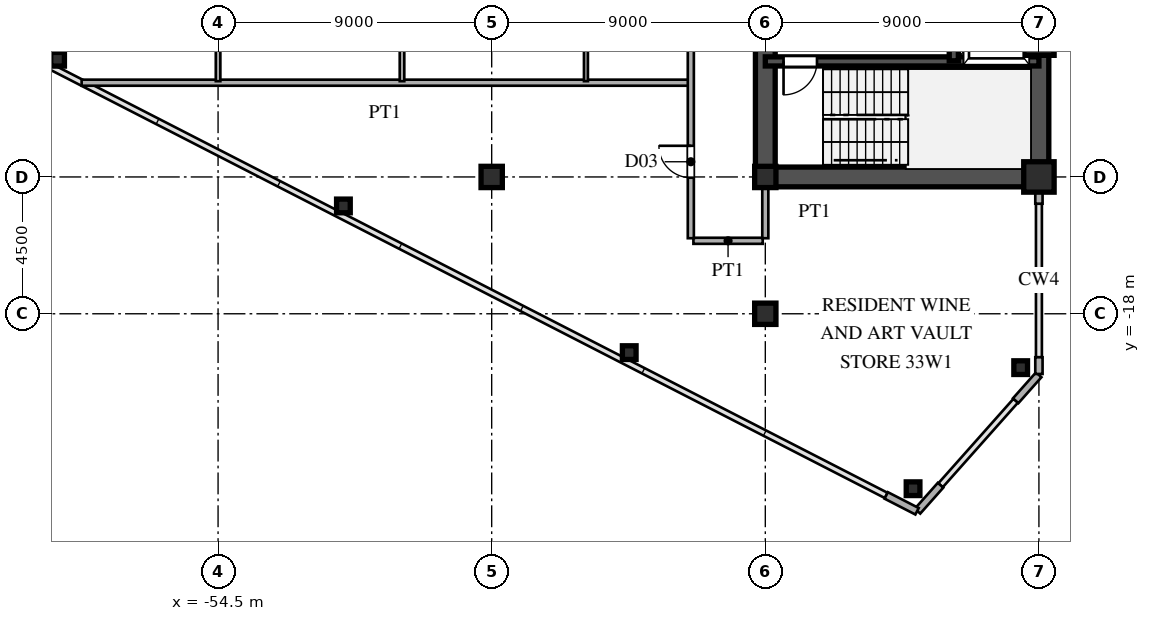
"""IFC4 building model, lengths in metres.
Left out: names, types, materials, properties, quantities, classifications, styles, units other than length and angle.
Written with IfcOpenShell. Run it as: python <this file> out.ifc"""

import sys

from ifc_helpers import new_model, si_unit, direction, frame, frame_2d, origin, origin_2d, place, context, subcontext, project, spatial, rectangle, hollow_rectangle, i_section, extrude, source, transform, mapped, element, fill, save


model = new_model("IFC4")
c1 = context("Model", 3, precision=1e-05, world=origin(), true_north=direction((0.0, 1.0)))
c2 = subcontext(c1, "Body", "Model", "MODEL_VIEW")
j1 = project(units=[si_unit("LENGTHUNIT", "METRE"), si_unit("PLANEANGLEUNIT", "RADIAN")], contexts=[c1])
p1 = place(None, origin())
s1 = spatial("IfcSite", under=j1, at=p1, CompositionType="ELEMENT")
p2 = place(p1, origin())
s2 = spatial("IfcBuilding", under=s1, at=p2, CompositionType="ELEMENT")
p3 = place(p2, frame((0.0, 0.0, 124.8)))
s3 = spatial("IfcBuildingStorey", under=s2, at=p3, CompositionType="ELEMENT", Elevation=124.8)
m1 = source(origin(), c2, "Body", "SweptSolid", [
    extrude(hollow_rectangle(XDim=1.0, YDim=1.0, WallThickness=0.042, at=origin_2d()), origin(), (0.0, 0.0, 1.0), 3.6),
])
for number, where, z_axis, x_axis in (
    (1, (-27.5, -13.5, 0.0), (0.0, 0.0, 1.0), (1.0, 0.0, 0.0)),
    (2, (-27.5, -9.0, 0.0), (0.0, 0.0, 1.0), (1.0, 0.0, 0.0)),
):
    element("IfcColumn", number, at=place(p3, frame(where, z_axis=z_axis, x_axis=x_axis)), inside=s3, PredefinedType="COLUMN", context=c2, shape_type="MappedRepresentation", body=[
        mapped(m1, transform((0.0, 0.0, 0.0), scale=1.0)),
    ])
m2 = source(origin(), c2, "Body", "SweptSolid", [
    extrude(i_section(OverallWidth=0.7, OverallDepth=0.7, WebThickness=0.028, FlangeThickness=0.045, at=origin_2d()), origin(), (0.0, 0.0, 1.0), 3.6),
])
for number, where, z_axis, x_axis in (
    (3, (-36.5, -18.0, 0.0), (0.0, 0.0, 1.0), (1.0, 0.0, 0.0)),
    (4, (-36.5, -13.5, 0.0), (0.0, 0.0, 1.0), (1.0, 0.0, 0.0)),
    (5, (-45.5, -13.5, 0.0), (0.0, 0.0, 1.0), (1.0, 0.0, 0.0)),
):
    element("IfcColumn", number, at=place(p3, frame(where, z_axis=z_axis, x_axis=x_axis)), inside=s3, PredefinedType="COLUMN", context=c2, shape_type="MappedRepresentation", body=[
        mapped(m2, transform((0.0, 0.0, 0.0), scale=1.0)),
    ])
m3 = source(origin(), c2, "Body", "SweptSolid", [
    extrude(hollow_rectangle(XDim=0.45, YDim=0.45, WallThickness=0.018, at=origin_2d()), origin(), (0.0, 0.0, 1.0), 3.6),
])
for number, where, z_axis, x_axis in (
    (6, (-28.1, -19.772, 0.0), (0.0, 0.0, 1.0), (1.0, 0.0, 0.0)),
    (7, (-31.64, -23.754, 0.0), (0.0, 0.0, 1.0), (1.0, 0.0, 0.0)),
    (8, (-40.976, -19.278, 0.0), (0.0, 0.0, 1.0), (1.0, 0.0, 0.0)),
    (9, (-50.377, -14.453, 0.0), (0.0, 0.0, 1.0), (1.0, 0.0, 0.0)),
    (10, (-59.779, -9.629, 0.0), (0.0, 0.0, 1.0), (1.0, 0.0, 0.0)),
):
    element("IfcColumn", number, at=place(p3, frame(where, z_axis=z_axis, x_axis=x_axis)), inside=s3, PredefinedType="COLUMN", context=c2, shape_type="MappedRepresentation", body=[
        mapped(m3, transform((0.0, 0.0, 0.0), scale=1.0)),
    ])
p4 = place(p3, frame((-27.5, -19.98, 0.0), z_axis=(0.0, 0.0, 1.0), x_axis=(0.0, 1.0, 0.0)))
e11 = element("IfcWall", 11, at=p4, inside=s3, PredefinedType="SOLIDWALL", context=c2, shape_type="SweptSolid", body=[
    extrude(rectangle(XDim=0.55, YDim=0.24, at=frame_2d((0.275, 0.0))), origin(), (0.0, 0.0, 1.0), 3.38),
])
p5 = place(p3, frame((-27.5, -14.38, 0.0), z_axis=(0.0, 0.0, 1.0), x_axis=(0.0, 1.0, 0.0)))
e12 = element("IfcWall", 12, at=p5, inside=s3, PredefinedType="SOLIDWALL", context=c2, shape_type="SweptSolid", body=[
    extrude(rectangle(XDim=0.55, YDim=0.24, at=frame_2d((0.275, 0.0))), origin(), (0.0, 0.0, 1.0), 2.88),
])
p6 = place(p3, frame((-32.523, -23.975, 0.0), z_axis=(0.0, 0.0, 1.0), x_axis=(0.889797395748, -0.456355776255, 0.0)))
e13 = element("IfcWall", 13, at=p6, inside=s3, PredefinedType="SOLIDWALL", context=c2, shape_type="SweptSolid", body=[
    extrude(rectangle(XDim=1.14, YDim=0.24, at=frame_2d((0.57, 0.0))), origin(), (0.0, 0.0, 1.0), 3.38),
])
for number, where, z_axis, x_axis in (
    (14, (-31.493, -24.492, 0.0), (0.0, 0.0, 1.0), (0.664, 0.747, 0.0)),
    (15, (-28.264, -20.86, 0.0), (0.0, 0.0, 1.0), (0.664, 0.747, 0.0)),
):
    element("IfcWall", number, at=place(p3, frame(where, z_axis=z_axis, x_axis=x_axis)), inside=s3, PredefinedType="SOLIDWALL", context=c2, shape_type="SweptSolid", body=[
        extrude(rectangle(XDim=1.14, YDim=0.24, at=frame_2d((0.57, 0.0))), origin(), (0.0, 0.0, 1.0), 3.38),
    ])
p7 = place(p3, frame((-27.5, -13.5, 0.0), z_axis=(0.0, 0.0, 1.0), x_axis=(0.0, 1.0, 0.0)))
e16 = element("IfcWall", 16, at=p7, inside=s3, PredefinedType="SHEAR", context=c2, shape_type="SweptSolid", body=[
    extrude(rectangle(XDim=12.2, YDim=0.65, at=frame_2d((6.1, 0.0))), origin(), (0.0, 0.0, 1.0), 3.38),
])
p8 = place(p3, frame((-36.5, -13.5, 0.0), z_axis=(0.0, 0.0, 1.0), x_axis=(1.0, 0.0, 0.0)))
e17 = element("IfcWall", 17, at=p8, inside=s3, PredefinedType="SHEAR", context=c2, shape_type="SweptSolid", body=[
    extrude(rectangle(XDim=9.0, YDim=0.65, at=frame_2d((4.5, 0.0))), origin(), (0.0, 0.0, 1.0), 3.38),
])
p9 = place(p3, frame((-36.5, -13.65, 0.0), z_axis=(0.0, 0.0, 1.0), x_axis=(0.0, 1.0, 0.0)))
e18 = element("IfcWall", 18, at=p9, inside=s3, PredefinedType="SHEAR", context=c2, shape_type="SweptSolid", body=[
    extrude(rectangle(XDim=7.15, YDim=0.65, at=frame_2d((3.575, 0.0))), origin(), (0.0, 0.0, 1.0), 3.38),
])
p10 = place(p9, frame((4.675, 0.0, 0.0)))
e19 = element("IfcOpeningElement", 19, at=p10, cuts=e18, PredefinedType="OPENING", context=c2, shape_type="SweptSolid", body=[
    extrude(rectangle(XDim=1.15, YDim=2.2, at=frame_2d((0.575, 1.1))), frame((0.0, 0.335, 0.0), z_axis=(0.0, -1.0, 0.0), x_axis=(1.0, 0.0, 0.0)), (0.0, 0.0, 1.0), 0.67),
])
p11 = place(p3, frame((-36.5, -9.7, 0.0), z_axis=(0.0, 0.0, 1.0), x_axis=(1.0, 0.0, 0.0)))
e20 = element("IfcWall", 20, at=p11, inside=s3, PredefinedType="SHEAR", context=c2, shape_type="SweptSolid", body=[
    extrude(rectangle(XDim=9.0, YDim=0.3, at=frame_2d((4.5, 0.0))), origin(), (0.0, 0.0, 1.0), 3.38),
])
p12 = place(p11, frame((0.6, 0.0, 0.0)))
e21 = element("IfcOpeningElement", 21, at=p12, cuts=e20, PredefinedType="OPENING", context=c2, shape_type="SweptSolid", body=[
    extrude(rectangle(XDim=1.1, YDim=2.2, at=frame_2d((0.55, 1.1))), frame((0.0, 0.16, 0.0), z_axis=(0.0, -1.0, 0.0), x_axis=(1.0, 0.0, 0.0)), (0.0, 0.0, 1.0), 0.32),
])
p13 = place(p3, frame((-30.3, -9.68, 0.0), z_axis=(0.0, 0.0, 1.0), x_axis=(0.0, 1.0, 0.0)))
e22 = element("IfcWall", 22, at=p13, inside=s3, PredefinedType="SHEAR", context=c2, shape_type="SweptSolid", body=[
    extrude(rectangle(XDim=2.56, YDim=0.3, at=frame_2d((1.28, 0.0))), origin(), (0.0, 0.0, 1.0), 3.38),
])
p14 = place(p13, frame((0.68, 0.0, 0.0)))
e23 = element("IfcOpeningElement", 23, at=p14, cuts=e22, PredefinedType="OPENING", context=c2, shape_type="SweptSolid", body=[
    extrude(rectangle(XDim=1.2, YDim=2.25, at=frame_2d((0.6, 1.125))), frame((0.0, 0.16, 0.0), z_axis=(0.0, -1.0, 0.0), x_axis=(1.0, 0.0, 0.0)), (0.0, 0.0, 1.0), 0.32),
])
p15 = place(p3, frame((-38.865, -15.6, 0.0), z_axis=(0.0, 0.0, 1.0), x_axis=(1.0, 0.0, 0.0)))
e24 = element("IfcWall", 24, at=p15, inside=s3, PredefinedType="PARTITIONING", context=c2, shape_type="SweptSolid", body=[
    extrude(rectangle(XDim=2.28, YDim=0.2, at=frame_2d((1.14, 0.0))), origin(), (0.0, 0.0, 1.0), 3.38),
])
p16 = place(p3, frame((-58.988, -10.4, 0.0), z_axis=(0.0, 0.0, 1.0), x_axis=(1.0, 0.0, 0.0)))
e25 = element("IfcWall", 25, at=p16, inside=s3, PredefinedType="PARTITIONING", context=c2, shape_type="SweptSolid", body=[
    extrude(rectangle(XDim=19.958, YDim=0.2, at=frame_2d((9.979, 0.0))), origin(), (0.0, 0.0, 1.0), 3.38),
])
p17 = place(p3, frame((-54.5, -10.35, 0.0), z_axis=(0.0, 0.0, 1.0), x_axis=(0.0, 1.0, 0.0)))
e26 = element("IfcWall", 26, at=p17, inside=s3, PredefinedType="PARTITIONING", context=c2, shape_type="SweptSolid", body=[
    extrude(rectangle(XDim=23.082, YDim=0.15, at=frame_2d((11.541, 0.0))), origin(), (0.0, 0.0, 1.0), 2.78),
])
p18 = place(p17, frame((6.475, 0.0, 0.0)))
e27 = element("IfcOpeningElement", 27, at=p18, cuts=e26, PredefinedType="OPENING", context=c2, shape_type="SweptSolid", body=[
    extrude(rectangle(XDim=0.95, YDim=2.15, at=frame_2d((0.475, 1.075))), frame((0.0, 0.085, 0.0), z_axis=(0.0, -1.0, 0.0), x_axis=(1.0, 0.0, 0.0)), (0.0, 0.0, 1.0), 0.17),
])
p19 = place(p17, frame((11.142, 0.0, 0.0)))
e28 = element("IfcOpeningElement", 28, at=p19, cuts=e26, PredefinedType="OPENING", context=c2, shape_type="SweptSolid", body=[
    extrude(rectangle(XDim=0.95, YDim=2.15, at=frame_2d((0.475, 1.075))), frame((0.0, 0.085, 0.0), z_axis=(0.0, -1.0, 0.0), x_axis=(1.0, 0.0, 0.0)), (0.0, 0.0, 1.0), 0.17),
])
p20 = place(p17, frame((20.575, 0.0, 0.0)))
e29 = element("IfcOpeningElement", 29, at=p20, cuts=e26, PredefinedType="OPENING", context=c2, shape_type="SweptSolid", body=[
    extrude(rectangle(XDim=0.95, YDim=2.15, at=frame_2d((0.475, 1.075))), frame((0.0, 0.085, 0.0), z_axis=(0.0, -1.0, 0.0), x_axis=(1.0, 0.0, 0.0)), (0.0, 0.0, 1.0), 0.17),
])
p21 = place(p17, frame((16.026, 0.0, 0.0)))
e30 = element("IfcOpeningElement", 30, at=p21, cuts=e26, PredefinedType="OPENING", context=c2, shape_type="SweptSolid", body=[
    extrude(rectangle(XDim=0.95, YDim=2.15, at=frame_2d((0.475, 1.075))), frame((0.0, 0.085, 0.0), z_axis=(0.0, -1.0, 0.0), x_axis=(1.0, 0.0, 0.0)), (0.0, 0.0, 1.0), 0.17),
])
p22 = place(p3, frame((-48.45, -10.35, 0.0), z_axis=(0.0, 0.0, 1.0), x_axis=(0.0, 1.0, 0.0)))
e31 = element("IfcWall", 31, at=p22, inside=s3, PredefinedType="PARTITIONING", context=c2, shape_type="SweptSolid", body=[
    extrude(rectangle(XDim=24.104, YDim=0.15, at=frame_2d((12.052, 0.0))), origin(), (0.0, 0.0, 1.0), 3.38),
])
p23 = place(p22, frame((6.475, 0.0, 0.0)))
e32 = element("IfcOpeningElement", 32, at=p23, cuts=e31, PredefinedType="OPENING", context=c2, shape_type="SweptSolid", body=[
    extrude(rectangle(XDim=0.95, YDim=2.15, at=frame_2d((0.475, 1.075))), frame((0.0, 0.085, 0.0), z_axis=(0.0, -1.0, 0.0), x_axis=(1.0, 0.0, 0.0)), (0.0, 0.0, 1.0), 0.17),
])
p24 = place(p22, frame((1.808, 0.0, 0.0)))
e33 = element("IfcOpeningElement", 33, at=p24, cuts=e31, PredefinedType="OPENING", context=c2, shape_type="SweptSolid", body=[
    extrude(rectangle(XDim=0.95, YDim=2.15, at=frame_2d((0.475, 1.075))), frame((0.0, 0.085, 0.0), z_axis=(0.0, -1.0, 0.0), x_axis=(1.0, 0.0, 0.0)), (0.0, 0.0, 1.0), 0.17),
])
p25 = place(p22, frame((21.128, 0.0, 0.0)))
e34 = element("IfcOpeningElement", 34, at=p25, cuts=e31, PredefinedType="OPENING", context=c2, shape_type="SweptSolid", body=[
    extrude(rectangle(XDim=0.95, YDim=2.15, at=frame_2d((0.475, 1.075))), frame((0.0, 0.085, 0.0), z_axis=(0.0, -1.0, 0.0), x_axis=(1.0, 0.0, 0.0)), (0.0, 0.0, 1.0), 0.17),
])
p26 = place(p22, frame((16.026, 0.0, 0.0)))
e35 = element("IfcOpeningElement", 35, at=p26, cuts=e31, PredefinedType="OPENING", context=c2, shape_type="SweptSolid", body=[
    extrude(rectangle(XDim=0.95, YDim=2.15, at=frame_2d((0.475, 1.075))), frame((0.0, 0.085, 0.0), z_axis=(0.0, -1.0, 0.0), x_axis=(1.0, 0.0, 0.0)), (0.0, 0.0, 1.0), 0.17),
])
p27 = place(p3, frame((-42.4, -10.35, 0.0), z_axis=(0.0, 0.0, 1.0), x_axis=(0.0, 1.0, 0.0)))
e36 = element("IfcWall", 36, at=p27, inside=s3, PredefinedType="PARTITIONING", context=c2, shape_type="SweptSolid", body=[
    extrude(rectangle(XDim=9.233, YDim=0.13, at=frame_2d((4.617, 0.0))), origin(), (0.0, 0.0, 1.0), 3.38),
])
p28 = place(p27, frame((6.475, 0.0, 0.0)))
e37 = element("IfcOpeningElement", 37, at=p28, cuts=e36, PredefinedType="OPENING", context=c2, shape_type="SweptSolid", body=[
    extrude(rectangle(XDim=0.95, YDim=2.15, at=frame_2d((0.475, 1.075))), frame((0.0, 0.075, 0.0), z_axis=(0.0, -1.0, 0.0), x_axis=(1.0, 0.0, 0.0)), (0.0, 0.0, 1.0), 0.15),
])
p29 = place(p3, frame((-38.95, -15.515, 0.0), z_axis=(0.0, 0.0, 1.0), x_axis=(0.0, 1.0, 0.0)))
e38 = element("IfcWall", 38, at=p29, inside=s3, PredefinedType="PARTITIONING", context=c2, shape_type="SweptSolid", body=[
    extrude(rectangle(XDim=31.03, YDim=0.2, at=frame_2d((15.515, 0.0))), origin(), (0.0, 0.0, 1.0), 3.38),
])
p30 = place(p29, frame((1.99, 0.0, 0.0)))
e39 = element("IfcOpeningElement", 39, at=p30, cuts=e38, PredefinedType="OPENING", context=c2, shape_type="SweptSolid", body=[
    extrude(rectangle(XDim=1.05, YDim=2.25, at=frame_2d((0.525, 1.125))), frame((0.0, 0.11, 0.0), z_axis=(0.0, -1.0, 0.0), x_axis=(1.0, 0.0, 0.0)), (0.0, 0.0, 1.0), 0.22),
])
p31 = place(p29, frame((11.38, 0.0, 0.0)))
e40 = element("IfcOpeningElement", 40, at=p31, cuts=e38, PredefinedType="OPENING", context=c2, shape_type="SweptSolid", body=[
    extrude(rectangle(XDim=1.05, YDim=2.25, at=frame_2d((0.525, 1.125))), frame((0.0, 0.11, 0.0), z_axis=(0.0, -1.0, 0.0), x_axis=(1.0, 0.0, 0.0)), (0.0, 0.0, 1.0), 0.22),
])
p32 = place(p29, frame((24.617, 0.0, 0.0)))
e41 = element("IfcOpeningElement", 41, at=p32, cuts=e38, PredefinedType="OPENING", context=c2, shape_type="SweptSolid", body=[
    extrude(rectangle(XDim=1.05, YDim=2.25, at=frame_2d((0.525, 1.125))), frame((0.0, 0.11, 0.0), z_axis=(0.0, -1.0, 0.0), x_axis=(1.0, 0.0, 0.0)), (0.0, 0.0, 1.0), 0.22),
])
p33 = place(p3, frame((-36.5, -15.515, 0.0), z_axis=(0.0, 0.0, 1.0), x_axis=(0.0, 1.0, 0.0)))
e42 = element("IfcWall", 42, at=p33, inside=s3, PredefinedType="PARTITIONING", context=c2, shape_type="SweptSolid", body=[
    extrude(rectangle(XDim=1.685, YDim=0.2, at=frame_2d((0.842, 0.0))), origin(), (0.0, 0.0, 1.0), 2.78),
])
m4 = source(origin(), c2, "Body", "SweptSolid", [
    extrude(rectangle(XDim=1.1, YDim=2.2, at=frame_2d((0.55, 1.1))), frame((0.0, 0.025, 0.0), z_axis=(0.0, -1.0, 0.0), x_axis=(1.0, 0.0, 0.0)), (0.0, 0.0, 1.0), 0.05),
])
p34 = place(p12, frame((1.1, 0.0, 0.0), z_axis=(0.0, 0.0, 1.0), x_axis=(-1.0, 0.0, 0.0)))
e43 = element("IfcDoor", 43, at=p34, inside=s3, OperationType="SINGLE_SWING_LEFT", PredefinedType="DOOR", context=c2, shape_type="MappedRepresentation", body=[
    mapped(m4, transform((0.0, 0.0, 0.0), scale=1.0)),
])
fill(e21, e43)
m5 = source(origin(), c2, "Body", "SweptSolid", [
    extrude(rectangle(XDim=1.05, YDim=2.25, at=frame_2d((0.525, 1.125))), frame((0.0, 0.025, 0.0), z_axis=(0.0, -1.0, 0.0), x_axis=(1.0, 0.0, 0.0)), (0.0, 0.0, 1.0), 0.05),
])
p35 = place(p30, origin())
e44 = element("IfcDoor", 44, at=p35, inside=s3, OperationType="SINGLE_SWING_RIGHT", PredefinedType="DOOR", context=c2, shape_type="MappedRepresentation", body=[
    mapped(m5, transform((0.0, 0.0, 0.0), scale=1.0)),
])
fill(e39, e44)
save(model, sys.argv[1])
